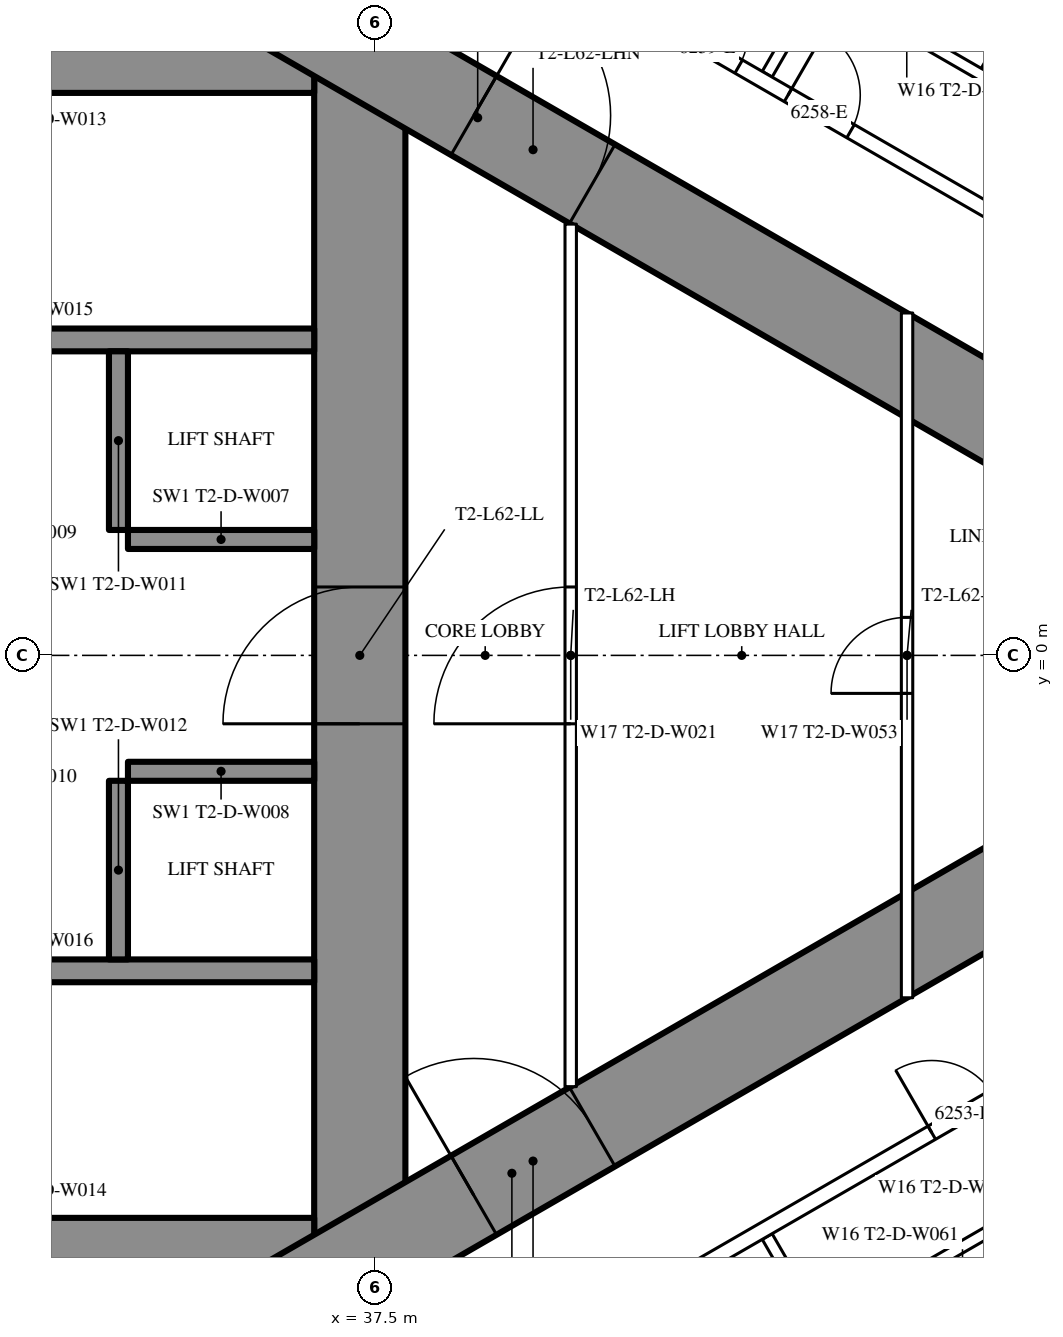
"""IFC4 building model, lengths in metres.
Left out: names, types, materials, properties, quantities, classifications, styles, units other than length and angle.
Written with IfcOpenShell. Run it as: python <this file> out.ifc"""

import sys

from ifc_helpers import new_model, si_unit, direction, frame, frame_2d, origin, place, context, subcontext, project, spatial, rectangle, extrude, element, fill, save


model = new_model("IFC4")
c1 = context("Model", 3, precision=1e-05, world=origin(), true_north=direction((0.0, 1.0)))
c2 = subcontext(c1, "Body", "Model", "MODEL_VIEW")
j1 = project(units=[si_unit("LENGTHUNIT", "METRE"), si_unit("PLANEANGLEUNIT", "RADIAN")], contexts=[c1])
p1 = place(None, origin())
s1 = spatial("IfcSite", under=j1, at=p1, CompositionType="ELEMENT")
p2 = place(p1, origin())
s2 = spatial("IfcBuilding", under=s1, at=p2, CompositionType="ELEMENT")
p3 = place(p2, frame((0.0, 0.0, 233.3)))
s3 = spatial("IfcBuildingStorey", under=s2, at=p3, CompositionType="ELEMENT", Elevation=233.3)
p4 = place(p3, frame((37.3, -8.6, 0.0), z_axis=(0.0, 0.0, 1.0), x_axis=(0.0, 1.0, 0.0)))
e1 = element("IfcWall", 1, at=p4, inside=s3, PredefinedType="SHEAR", context=c2, shape_type="SweptSolid", body=[
    extrude(rectangle(XDim=17.2, YDim=1.2, at=frame_2d((8.6, 0.0))), origin(), (0.0, 0.0, 1.0), 3.6),
])
p5 = place(p4, frame((7.7, 0.0, 0.0)))
e2 = element("IfcOpeningElement", 2, at=p5, cuts=e1, PredefinedType="OPENING", context=c2, shape_type="SweptSolid", body=[
    extrude(rectangle(XDim=1.8, YDim=2.2, at=frame_2d((0.9, 1.1))), frame((0.0, 0.61, 0.0), z_axis=(0.0, -1.0, 0.0), x_axis=(1.0, 0.0, 0.0)), (0.0, 0.0, 1.0), 1.22),
])
p6 = place(p3, frame((28.3, -8.0, 0.0), z_axis=(0.0, 0.0, 1.0), x_axis=(1.0, 0.0, 0.0)))
e3 = element("IfcWall", 3, at=p6, inside=s3, PredefinedType="SHEAR", context=c2, shape_type="SweptSolid", body=[
    extrude(rectangle(XDim=8.4, YDim=1.2, at=frame_2d((4.2, 0.0))), origin(), (0.0, 0.0, 1.0), 3.6),
])
p7 = place(p6, frame((0.25, 0.0, 0.0)))
e4 = element("IfcOpeningElement", 4, at=p7, cuts=e3, PredefinedType="OPENING", context=c2, shape_type="SweptSolid", body=[
    extrude(rectangle(XDim=1.0, YDim=2.2, at=frame_2d((0.5, 1.1))), frame((0.0, 0.61, 0.0), z_axis=(0.0, -1.0, 0.0), x_axis=(1.0, 0.0, 0.0)), (0.0, 0.0, 1.0), 1.22),
])
p8 = place(p3, frame((28.3, 8.0, 0.0), z_axis=(0.0, 0.0, 1.0), x_axis=(1.0, 0.0, 0.0)))
e5 = element("IfcWall", 5, at=p8, inside=s3, PredefinedType="SHEAR", context=c2, shape_type="SweptSolid", body=[
    extrude(rectangle(XDim=8.4, YDim=1.2, at=frame_2d((4.2, 0.0))), origin(), (0.0, 0.0, 1.0), 3.6),
])
p9 = place(p8, frame((0.25, 0.0, 0.0)))
e6 = element("IfcOpeningElement", 6, at=p9, cuts=e5, PredefinedType="OPENING", context=c2, shape_type="SweptSolid", body=[
    extrude(rectangle(XDim=1.0, YDim=2.2, at=frame_2d((0.5, 1.1))), frame((0.0, 0.61, 0.0), z_axis=(0.0, -1.0, 0.0), x_axis=(1.0, 0.0, 0.0)), (0.0, 0.0, 1.0), 1.22),
])
for number, where, z_axis, x_axis in (
    (7, (28.3, -4.15, 0.0), (0.0, 0.0, 1.0), (1.0, 0.0, 0.0)),
    (8, (28.3, 4.15, 0.0), (0.0, 0.0, 1.0), (1.0, 0.0, 0.0)),
):
    element("IfcWall", number, at=place(p3, frame(where, z_axis=z_axis, x_axis=x_axis)), inside=s3, PredefinedType="SHEAR", context=c2, shape_type="SweptSolid", body=[
        extrude(rectangle(XDim=8.4, YDim=0.3, at=frame_2d((4.2, 0.0))), origin(), (0.0, 0.0, 1.0), 3.6),
    ])
p10 = place(p3, frame((34.125, -4.0, 0.0), z_axis=(0.0, 0.0, 1.0), x_axis=(0.0, 1.0, 0.0)))
e9 = element("IfcWall", 9, at=p10, inside=s3, PredefinedType="SHEAR", context=c2, shape_type="SweptSolid", body=[
    extrude(rectangle(XDim=2.35, YDim=0.25, at=frame_2d((1.175, 0.0))), origin(), (0.0, 0.0, 1.0), 3.6),
])
p11 = place(p3, frame((34.25, -1.525, 0.0), z_axis=(0.0, 0.0, 1.0), x_axis=(1.0, 0.0, 0.0)))
e10 = element("IfcWall", 10, at=p11, inside=s3, PredefinedType="SHEAR", context=c2, shape_type="SweptSolid", body=[
    extrude(rectangle(XDim=2.45, YDim=0.25, at=frame_2d((1.225, 0.0))), origin(), (0.0, 0.0, 1.0), 3.6),
])
p12 = place(p3, frame((34.125, 1.65, 0.0), z_axis=(0.0, 0.0, 1.0), x_axis=(0.0, 1.0, 0.0)))
e11 = element("IfcWall", 11, at=p12, inside=s3, PredefinedType="SHEAR", context=c2, shape_type="SweptSolid", body=[
    extrude(rectangle(XDim=2.35, YDim=0.25, at=frame_2d((1.175, 0.0))), origin(), (0.0, 0.0, 1.0), 3.6),
])
p13 = place(p3, frame((34.25, 1.525, 0.0), z_axis=(0.0, 0.0, 1.0), x_axis=(1.0, 0.0, 0.0)))
e12 = element("IfcWall", 12, at=p13, inside=s3, PredefinedType="SHEAR", context=c2, shape_type="SweptSolid", body=[
    extrude(rectangle(XDim=2.45, YDim=0.25, at=frame_2d((1.225, 0.0))), origin(), (0.0, 0.0, 1.0), 3.6),
])
p14 = place(p3, frame((27.2, -13.8, 0.0), z_axis=(0.0, 0.0, 1.0), x_axis=(0.866027159892, 0.499996958321, 0.0)))
e13 = element("IfcWall", 13, at=p14, inside=s3, PredefinedType="SHEAR", context=c2, shape_type="SweptSolid", body=[
    extrude(rectangle(XDim=27.947, YDim=1.2, at=frame_2d((13.973, 0.0))), origin(), (0.0, 0.0, 1.0), 3.6),
])
p15 = place(p14, frame((4.6, 0.0, 0.0)))
e14 = element("IfcOpeningElement", 14, at=p15, cuts=e13, PredefinedType="OPENING", context=c2, shape_type="SweptSolid", body=[
    extrude(rectangle(XDim=1.0, YDim=2.2, at=frame_2d((0.5, 1.1))), frame((0.0, 0.61, 0.0), z_axis=(0.0, -1.0, 0.0), x_axis=(1.0, 0.0, 0.0)), (0.0, 0.0, 1.0), 1.22),
])
p16 = place(p14, frame((13.395, 0.0, 0.0)))
e15 = element("IfcOpeningElement", 15, at=p16, cuts=e13, PredefinedType="OPENING", context=c2, shape_type="SweptSolid", body=[
    extrude(rectangle(XDim=1.8, YDim=2.2, at=frame_2d((0.9, 1.1))), frame((0.0, 0.61, 0.0), z_axis=(0.0, -1.0, 0.0), x_axis=(1.0, 0.0, 0.0)), (0.0, 0.0, 1.0), 1.22),
])
p17 = place(p3, frame((27.2, 13.8, 0.0), z_axis=(0.0, 0.0, 1.0), x_axis=(0.866024515034, -0.500001539357, 0.0)))
e16 = element("IfcWall", 16, at=p17, inside=s3, PredefinedType="SHEAR", context=c2, shape_type="SweptSolid", body=[
    extrude(rectangle(XDim=26.907, YDim=1.2, at=frame_2d((13.454, 0.0))), origin(), (0.0, 0.0, 1.0), 3.6),
])
p18 = place(p17, frame((4.6, 0.0, 0.0)))
e17 = element("IfcOpeningElement", 17, at=p18, cuts=e16, PredefinedType="OPENING", context=c2, shape_type="SweptSolid", body=[
    extrude(rectangle(XDim=1.0, YDim=2.2, at=frame_2d((0.5, 1.1))), frame((0.0, 0.61, 0.0), z_axis=(0.0, -1.0, 0.0), x_axis=(1.0, 0.0, 0.0)), (0.0, 0.0, 1.0), 1.22),
])
p19 = place(p17, frame((13.395, 0.0, 0.0)))
e18 = element("IfcOpeningElement", 18, at=p19, cuts=e16, PredefinedType="OPENING", context=c2, shape_type="SweptSolid", body=[
    extrude(rectangle(XDim=1.8, YDim=2.2, at=frame_2d((0.9, 1.1))), frame((0.0, 0.61, 0.0), z_axis=(0.0, -1.0, 0.0), x_axis=(1.0, 0.0, 0.0)), (0.0, 0.0, 1.0), 1.22),
])
for number, where, z_axis, x_axis in (
    (19, (42.66, -7.646, 0.0), (0.0, 0.0, 1.0), (0.5, -0.866, 0.0)),
    (20, (42.66, 7.646, 0.0), (0.0, 0.0, 1.0), (0.5, 0.866, 0.0)),
):
    element("IfcWall", number, at=place(p3, frame(where, z_axis=z_axis, x_axis=x_axis)), inside=s3, PredefinedType="PARTITIONING", context=c2, shape_type="SweptSolid", body=[
        extrude(rectangle(XDim=6.398, YDim=0.15, at=frame_2d((3.199, 0.0))), origin(), (0.0, 0.0, 1.0), 2.45),
    ])
p20 = place(p3, frame((28.959, 15.44, 0.0), z_axis=(0.0, 0.0, 1.0), x_axis=(0.866028936079, -0.499993881836, 0.0)))
e21 = element("IfcWall", 21, at=p20, inside=s3, PredefinedType="PARTITIONING", context=c2, shape_type="SweptSolid", body=[
    extrude(rectangle(XDim=20.503, YDim=0.2, at=frame_2d((10.251, 0.0))), origin(), (0.0, 0.0, 1.0), 3.35),
])
p21 = place(p20, frame((16.137, 0.0, 0.0)))
e22 = element("IfcOpeningElement", 22, at=p21, cuts=e21, PredefinedType="OPENING", context=c2, shape_type="SweptSolid", body=[
    extrude(rectangle(XDim=0.95, YDim=2.2, at=frame_2d((0.475, 1.1))), frame((0.0, 0.11, 0.0), z_axis=(0.0, -1.0, 0.0), x_axis=(1.0, 0.0, 0.0)), (0.0, 0.0, 1.0), 0.22),
])
p22 = place(p20, frame((14.437, 0.0, 0.0)))
e23 = element("IfcOpeningElement", 23, at=p22, cuts=e21, PredefinedType="OPENING", context=c2, shape_type="SweptSolid", body=[
    extrude(rectangle(XDim=0.95, YDim=2.2, at=frame_2d((0.475, 1.1))), frame((0.0, 0.11, 0.0), z_axis=(0.0, -1.0, 0.0), x_axis=(1.0, 0.0, 0.0)), (0.0, 0.0, 1.0), 0.22),
])
p23 = place(p20, frame((2.244, 0.0, 0.0)))
e24 = element("IfcOpeningElement", 24, at=p23, cuts=e21, PredefinedType="OPENING", context=c2, shape_type="SweptSolid", body=[
    extrude(rectangle(XDim=1.8, YDim=2.03, at=frame_2d((0.9, 1.015))), frame((0.0, 0.11, 0.0), z_axis=(0.0, -1.0, 0.0), x_axis=(1.0, 0.0, 0.0)), (0.0, 0.0, 1.0), 0.22),
])
p24 = place(p3, frame((44.514, -8.191, 0.0), z_axis=(0.0, 0.0, 1.0), x_axis=(0.866031185235, 0.4999899861, 0.0)))
e25 = element("IfcWall", 25, at=p24, inside=s3, PredefinedType="PARTITIONING", context=c2, shape_type="SweptSolid", body=[
    extrude(rectangle(XDim=2.475, YDim=0.15, at=frame_2d((1.238, 0.0))), origin(), (0.0, 0.0, 1.0), 3.35),
])
p25 = place(p3, frame((45.503, 7.621, 0.0), z_axis=(0.0, 0.0, 1.0), x_axis=(0.500006934395, 0.866021400173, 0.0)))
e26 = element("IfcWall", 26, at=p25, inside=s3, PredefinedType="PARTITIONING", context=c2, shape_type="SweptSolid", body=[
    extrude(rectangle(XDim=2.6, YDim=0.15, at=frame_2d((1.3, 0.0))), origin(), (0.0, 0.0, 1.0), 3.35),
])
p26 = place(p25, frame((0.9, 0.0, 0.0)))
e27 = element("IfcOpeningElement", 27, at=p26, cuts=e26, PredefinedType="OPENING", context=c2, shape_type="SweptSolid", body=[
    extrude(rectangle(XDim=0.8, YDim=2.2, at=frame_2d((0.4, 1.1))), frame((0.0, 0.085, 0.0), z_axis=(0.0, -1.0, 0.0), x_axis=(1.0, 0.0, 0.0)), (0.0, 0.0, 1.0), 0.17),
])
p27 = place(p3, frame((43.425, 8.821, 0.0), z_axis=(0.0, 0.0, 1.0), x_axis=(0.866006523861, -0.500032699561, 0.0)))
e28 = element("IfcWall", 28, at=p27, inside=s3, PredefinedType="PARTITIONING", context=c2, shape_type="SweptSolid", body=[
    extrude(rectangle(XDim=2.475, YDim=0.15, at=frame_2d((1.237, 0.0))), origin(), (0.0, 0.0, 1.0), 2.5),
])
p28 = place(p3, frame((28.959, -15.44, 0.0), z_axis=(0.0, 0.0, 1.0), x_axis=(0.866025204199, 0.500000345692, 0.0)))
e29 = element("IfcWall", 29, at=p28, inside=s3, PredefinedType="PARTITIONING", context=c2, shape_type="SweptSolid", body=[
    extrude(rectangle(XDim=19.646, YDim=0.2, at=frame_2d((9.823, 0.0))), origin(), (0.0, 0.0, 1.0), 3.35),
])
p29 = place(p28, frame((1.494, 0.0, 0.0)))
e30 = element("IfcOpeningElement", 30, at=p29, cuts=e29, PredefinedType="OPENING", context=c2, shape_type="SweptSolid", body=[
    extrude(rectangle(XDim=1.8, YDim=2.03, at=frame_2d((0.9, 1.015))), frame((0.0, 0.11, 0.0), z_axis=(0.0, -1.0, 0.0), x_axis=(1.0, 0.0, 0.0)), (0.0, 0.0, 1.0), 0.22),
])
p30 = place(p28, frame((7.687, 0.0, 0.0)))
e31 = element("IfcOpeningElement", 31, at=p30, cuts=e29, PredefinedType="OPENING", context=c2, shape_type="SweptSolid", body=[
    extrude(rectangle(XDim=1.0, YDim=2.2, at=frame_2d((0.5, 1.1))), frame((0.0, 0.11, 0.0), z_axis=(0.0, -1.0, 0.0), x_axis=(1.0, 0.0, 0.0)), (0.0, 0.0, 1.0), 0.22),
])
p31 = place(p28, frame((18.321, 0.0, 0.0)))
e32 = element("IfcOpeningElement", 32, at=p31, cuts=e29, PredefinedType="OPENING", context=c2, shape_type="SweptSolid", body=[
    extrude(rectangle(XDim=0.95, YDim=2.2, at=frame_2d((0.475, 1.1))), frame((0.0, 0.11, 0.0), z_axis=(0.0, -1.0, 0.0), x_axis=(1.0, 0.0, 0.0)), (0.0, 0.0, 1.0), 0.22),
])
p32 = place(p3, frame((40.075, -5.674, 0.0), z_axis=(0.0, 0.0, 1.0), x_axis=(0.0, 1.0, 0.0)))
e33 = element("IfcWall", 33, at=p32, inside=s3, PredefinedType="PARTITIONING", context=c2, shape_type="SweptSolid", body=[
    extrude(rectangle(XDim=11.348, YDim=0.15, at=frame_2d((5.674, 0.0))), origin(), (0.0, 0.0, 1.0), 3.35),
])
p33 = place(p32, frame((4.774, 0.0, 0.0)))
e34 = element("IfcOpeningElement", 34, at=p33, cuts=e33, PredefinedType="OPENING", context=c2, shape_type="SweptSolid", body=[
    extrude(rectangle(XDim=1.8, YDim=2.2, at=frame_2d((0.9, 1.1))), frame((0.0, 0.085, 0.0), z_axis=(0.0, -1.0, 0.0), x_axis=(1.0, 0.0, 0.0)), (0.0, 0.0, 1.0), 0.17),
])
p34 = place(p3, frame((44.5, -4.505, 0.0), z_axis=(0.0, 0.0, 1.0), x_axis=(0.0, 1.0, 0.0)))
e35 = element("IfcWall", 35, at=p34, inside=s3, PredefinedType="PARTITIONING", context=c2, shape_type="SweptSolid", body=[
    extrude(rectangle(XDim=9.009, YDim=0.15, at=frame_2d((4.505, 0.0))), origin(), (0.0, 0.0, 1.0), 3.35),
])
p35 = place(p34, frame((4.005, 0.0, 0.0)))
e36 = element("IfcOpeningElement", 36, at=p35, cuts=e35, PredefinedType="OPENING", context=c2, shape_type="SweptSolid", body=[
    extrude(rectangle(XDim=1.0, YDim=2.2, at=frame_2d((0.5, 1.1))), frame((0.0, 0.085, 0.0), z_axis=(0.0, -1.0, 0.0), x_axis=(1.0, 0.0, 0.0)), (0.0, 0.0, 1.0), 0.17),
])
p36 = place(p31, origin())
e37 = element("IfcDoor", 37, at=p36, inside=s3, OperationType="SINGLE_SWING_LEFT", PredefinedType="DOOR", context=c2, shape_type="SweptSolid", body=[
    extrude(rectangle(XDim=0.95, YDim=2.2, at=frame_2d((0.475, 1.1))), frame((0.0, 0.025, 0.0), z_axis=(0.0, -1.0, 0.0), x_axis=(1.0, 0.0, 0.0)), (0.0, 0.0, 1.0), 0.05),
])
fill(e32, e37)
p37 = place(p21, origin())
e38 = element("IfcDoor", 38, at=p37, inside=s3, OperationType="SINGLE_SWING_LEFT", PredefinedType="DOOR", context=c2, shape_type="SweptSolid", body=[
    extrude(rectangle(XDim=0.95, YDim=2.2, at=frame_2d((0.475, 1.1))), frame((0.0, 0.025, 0.0), z_axis=(0.0, -1.0, 0.0), x_axis=(1.0, 0.0, 0.0)), (0.0, 0.0, 1.0), 0.05),
])
fill(e22, e38)
p38 = place(p22, origin())
e39 = element("IfcDoor", 39, at=p38, inside=s3, OperationType="SINGLE_SWING_LEFT", PredefinedType="DOOR", context=c2, shape_type="SweptSolid", body=[
    extrude(rectangle(XDim=0.95, YDim=2.2, at=frame_2d((0.475, 1.1))), frame((0.0, 0.025, 0.0), z_axis=(0.0, -1.0, 0.0), x_axis=(1.0, 0.0, 0.0)), (0.0, 0.0, 1.0), 0.05),
])
fill(e23, e39)
p39 = place(p33, origin())
e40 = element("IfcDoor", 40, at=p39, inside=s3, OperationType="DOUBLE_DOOR_SINGLE_SWING", PredefinedType="DOOR", context=c2, shape_type="SweptSolid", body=[
    extrude(rectangle(XDim=1.8, YDim=2.2, at=frame_2d((0.9, 1.1))), frame((0.0, 0.025, 0.0), z_axis=(0.0, -1.0, 0.0), x_axis=(1.0, 0.0, 0.0)), (0.0, 0.0, 1.0), 0.05),
])
fill(e34, e40)
p40 = place(p35, origin())
e41 = element("IfcDoor", 41, at=p40, inside=s3, OperationType="SINGLE_SWING_LEFT", PredefinedType="DOOR", context=c2, shape_type="SweptSolid", body=[
    extrude(rectangle(XDim=1.0, YDim=2.2, at=frame_2d((0.5, 1.1))), frame((0.0, 0.025, 0.0), z_axis=(0.0, -1.0, 0.0), x_axis=(1.0, 0.0, 0.0)), (0.0, 0.0, 1.0), 0.05),
])
fill(e36, e41)
p41 = place(p16, origin())
e42 = element("IfcDoor", 42, at=p41, inside=s3, OperationType="DOUBLE_DOOR_SINGLE_SWING", PredefinedType="DOOR", context=c2, shape_type="SweptSolid", body=[
    extrude(rectangle(XDim=1.8, YDim=2.2, at=frame_2d((0.9, 1.1))), frame((0.0, 0.025, 0.0), z_axis=(0.0, -1.0, 0.0), x_axis=(1.0, 0.0, 0.0)), (0.0, 0.0, 1.0), 0.05),
])
fill(e15, e42)
p42 = place(p19, origin())
e43 = element("IfcDoor", 43, at=p42, inside=s3, OperationType="DOUBLE_DOOR_SINGLE_SWING", PredefinedType="DOOR", context=c2, shape_type="SweptSolid", body=[
    extrude(rectangle(XDim=1.8, YDim=2.2, at=frame_2d((0.9, 1.1))), frame((0.0, 0.025, 0.0), z_axis=(0.0, -1.0, 0.0), x_axis=(1.0, 0.0, 0.0)), (0.0, 0.0, 1.0), 0.05),
])
fill(e18, e43)
p43 = place(p5, origin())
e44 = element("IfcDoor", 44, at=p43, inside=s3, OperationType="DOUBLE_DOOR_SINGLE_SWING", PredefinedType="DOOR", context=c2, shape_type="SweptSolid", body=[
    extrude(rectangle(XDim=1.8, YDim=2.2, at=frame_2d((0.9, 1.1))), frame((0.0, 0.025, 0.0), z_axis=(0.0, -1.0, 0.0), x_axis=(1.0, 0.0, 0.0)), (0.0, 0.0, 1.0), 0.05),
])
fill(e2, e44)
save(model, sys.argv[1])
